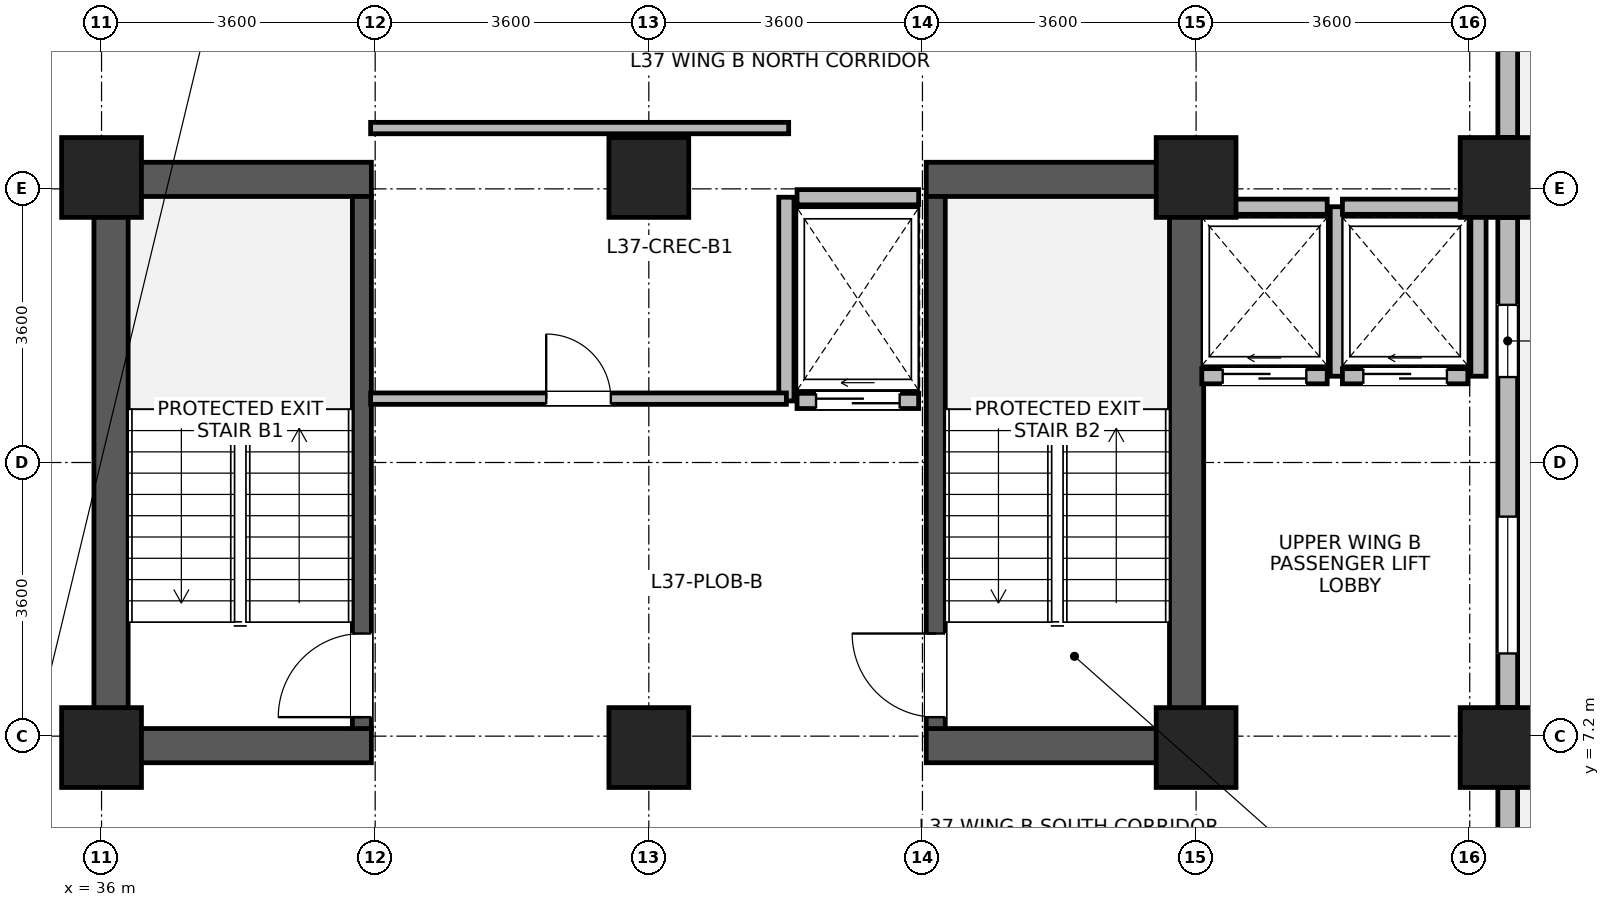
"""IFC4 building model, lengths in metres.
Left out: names, types, materials, properties, quantities, classifications, styles, units other than length and angle.
Written with IfcOpenShell. Run it as: python <this file> out.ifc"""

import sys

from ifc_helpers import new_model, si_unit, direction, frame, frame_2d, origin, origin_2d, place, context, subcontext, project, spatial, rectangle, extrude, source, transform, mapped, element, fill, save


model = new_model("IFC4")
c1 = context("Model", 3, precision=1e-05, world=origin(), true_north=direction((0.0, 1.0)))
c2 = subcontext(c1, "Body", "Model", "MODEL_VIEW")
j1 = project(units=[si_unit("LENGTHUNIT", "METRE"), si_unit("PLANEANGLEUNIT", "RADIAN")], contexts=[c1])
p1 = place(None, origin())
s1 = spatial("IfcSite", under=j1, at=p1, CompositionType="ELEMENT")
p2 = place(p1, origin())
s2 = spatial("IfcBuilding", under=s1, at=p2, CompositionType="ELEMENT")
p3 = place(p2, frame((0.0, 0.0, 147.6)))
s3 = spatial("IfcBuildingStorey", under=s2, at=p3, CompositionType="ELEMENT", Elevation=147.6)
for number, where, z_axis, x_axis in (
    (1, (36.125, 6.85, 0.0), (0.0, 0.0, 1.0), (0.0, 1.0, 0.0)),
    (2, (50.275, 6.85, 0.0), (0.0, 0.0, 1.0), (0.0, 1.0, 0.0)),
):
    element("IfcWall", number, at=place(p3, frame(where, z_axis=z_axis, x_axis=x_axis)), inside=s3, PredefinedType="SHEAR", context=c2, shape_type="SweptSolid", body=[
        extrude(rectangle(XDim=7.9, YDim=0.45, at=frame_2d((3.95, 0.0))), origin(), (0.0, 0.0, 1.0), 3.46),
    ])
for number, where, z_axis, x_axis in (
    (3, (36.35, 7.075, 0.0), (0.0, 0.0, 1.0), (1.0, 0.0, 0.0)),
    (4, (46.85, 7.075, 0.0), (0.0, 0.0, 1.0), (1.0, 0.0, 0.0)),
    (5, (36.35, 14.525, 0.0), (0.0, 0.0, 1.0), (1.0, 0.0, 0.0)),
    (6, (46.85, 14.525, 0.0), (0.0, 0.0, 1.0), (1.0, 0.0, 0.0)),
):
    element("IfcWall", number, at=place(p3, frame(where, z_axis=z_axis, x_axis=x_axis)), inside=s3, PredefinedType="SHEAR", context=c2, shape_type="SweptSolid", body=[
        extrude(rectangle(XDim=3.2, YDim=0.45, at=frame_2d((1.6, 0.0))), origin(), (0.0, 0.0, 1.0), 3.46),
    ])
p4 = place(p3, frame((39.425, 7.3, 0.0), z_axis=(0.0, 0.0, 1.0), x_axis=(0.0, 1.0, 0.0)))
e7 = element("IfcWall", 7, at=p4, inside=s3, PredefinedType="SHEAR", context=c2, shape_type="SweptSolid", body=[
    extrude(rectangle(XDim=7.0, YDim=0.25, at=frame_2d((3.5, 0.0))), origin(), (0.0, 0.0, 1.0), 3.46),
])
p5 = place(p4, frame((0.15, 0.0, 0.0)))
e8 = element("IfcOpeningElement", 8, at=p5, cuts=e7, PredefinedType="OPENING", context=c2, shape_type="SweptSolid", body=[
    extrude(rectangle(XDim=1.1, YDim=2.08, at=frame_2d((0.55, 1.04))), frame((0.0, 0.135, 0.0), z_axis=(0.0, -1.0, 0.0), x_axis=(1.0, 0.0, 0.0)), (0.0, 0.0, 1.0), 0.27),
])
p6 = place(p3, frame((46.975, 7.3, 0.0), z_axis=(0.0, 0.0, 1.0), x_axis=(0.0, 1.0, 0.0)))
e9 = element("IfcWall", 9, at=p6, inside=s3, PredefinedType="SHEAR", context=c2, shape_type="SweptSolid", body=[
    extrude(rectangle(XDim=7.0, YDim=0.25, at=frame_2d((3.5, 0.0))), origin(), (0.0, 0.0, 1.0), 3.46),
])
p7 = place(p6, frame((0.15, 0.0, 0.0)))
e10 = element("IfcOpeningElement", 10, at=p7, cuts=e9, PredefinedType="OPENING", context=c2, shape_type="SweptSolid", body=[
    extrude(rectangle(XDim=1.1, YDim=2.08, at=frame_2d((0.55, 1.04))), frame((0.0, 0.135, 0.0), z_axis=(0.0, -1.0, 0.0), x_axis=(1.0, 0.0, 0.0)), (0.0, 0.0, 1.0), 0.27),
])
m1 = source(origin(), c2, "Body", "SweptSolid", [
    extrude(rectangle(XDim=1.05, YDim=1.05, at=origin_2d()), origin(), (0.0, 0.0, 1.0), 3.7),
])
for number, where, z_axis, x_axis in (
    (11, (36.0, 7.05, 0.0), (0.0, 0.0, 1.0), (1.0, 0.0, 0.0)),
    (12, (36.0, 14.55, 0.0), (0.0, 0.0, 1.0), (1.0, 0.0, 0.0)),
    (13, (43.2, 7.05, 0.0), (0.0, 0.0, 1.0), (1.0, 0.0, 0.0)),
    (14, (43.2, 14.55, 0.0), (0.0, 0.0, 1.0), (1.0, 0.0, 0.0)),
    (15, (50.4, 7.05, 0.0), (0.0, 0.0, 1.0), (1.0, 0.0, 0.0)),
    (16, (50.4, 14.55, 0.0), (0.0, 0.0, 1.0), (1.0, 0.0, 0.0)),
    (17, (54.4, 7.05, 0.0), (0.0, 0.0, 1.0), (1.0, 0.0, 0.0)),
    (18, (54.4, 14.55, 0.0), (0.0, 0.0, 1.0), (1.0, 0.0, 0.0)),
):
    element("IfcColumn", number, at=place(p3, frame(where, z_axis=z_axis, x_axis=x_axis)), inside=s3, PredefinedType="COLUMN", context=c2, shape_type="MappedRepresentation", body=[
        mapped(m1, transform((0.0, 0.0, 0.0), x_axis=(1.0, 0.0, 0.0), y_axis=(0.0, 1.0, 0.0), z_axis=(0.0, 0.0, 1.0), scale=1.0)),
    ])
p8 = place(p3, frame((54.5, 6.524, 0.0), z_axis=(0.0, 0.0, 1.0), x_axis=(0.0, -1.0, 0.0)))
e19 = element("IfcWall", 19, at=p8, inside=s3, PredefinedType="STANDARD", context=c2, shape_type="SweptSolid", body=[
    extrude(rectangle(XDim=4.854, YDim=0.26, at=frame_2d((2.427, 0.0))), origin(), (0.0, 0.0, 1.0), 3.44),
])
p9 = place(p8, frame((2.648, 0.0, 0.0)))
e20 = element("IfcOpeningElement", 20, at=p9, cuts=e19, PredefinedType="OPENING", context=c2, shape_type="SweptSolid", body=[
    extrude(rectangle(XDim=1.5, YDim=2.15, at=frame_2d((0.75, 1.075))), frame((0.0, 0.14, 0.0), z_axis=(0.0, -1.0, 0.0), x_axis=(1.0, 0.0, 0.0)), (0.0, 0.0, 1.0), 0.28),
])
p10 = place(p3, frame((54.5, 14.024, 0.0), z_axis=(0.0, 0.0, 1.0), x_axis=(0.0, -1.0, 0.0)))
e21 = element("IfcWall", 21, at=p10, inside=s3, PredefinedType="STANDARD", context=c2, shape_type="SweptSolid", body=[
    extrude(rectangle(XDim=6.448, YDim=0.26, at=frame_2d((3.224, 0.0))), origin(), (0.0, 0.0, 1.0), 2.99),
])
p11 = place(p10, frame((3.936, 0.0, 0.85)))
e22 = element("IfcOpeningElement", 22, at=p11, cuts=e21, PredefinedType="OPENING", context=c2, shape_type="SweptSolid", body=[
    extrude(rectangle(XDim=1.8, YDim=1.85, at=frame_2d((0.9, 0.925))), frame((0.0, 0.14, 0.0), z_axis=(0.0, -1.0, 0.0), x_axis=(1.0, 0.0, 0.0)), (0.0, 0.0, 1.0), 0.28),
])
p12 = place(p10, frame((1.15, 0.0, 0.85)))
e23 = element("IfcOpeningElement", 23, at=p12, cuts=e21, PredefinedType="OPENING", context=c2, shape_type="SweptSolid", body=[
    extrude(rectangle(XDim=0.95, YDim=1.75, at=frame_2d((0.475, 0.875))), frame((0.0, 0.14, 0.0), z_axis=(0.0, -1.0, 0.0), x_axis=(1.0, 0.0, 0.0)), (0.0, 0.0, 1.0), 0.28),
])
p13 = place(p3, frame((54.5, 21.074, 0.0), z_axis=(0.0, 0.0, 1.0), x_axis=(0.0, -1.0, 0.0)))
e24 = element("IfcWall", 24, at=p13, inside=s3, PredefinedType="STANDARD", context=c2, shape_type="SweptSolid", body=[
    extrude(rectangle(XDim=5.998, YDim=0.26, at=frame_2d((2.999, 0.0))), origin(), (0.0, 0.0, 1.0), 2.99),
])
p14 = place(p13, frame((0.6, 0.0, 0.85)))
e25 = element("IfcOpeningElement", 25, at=p14, cuts=e24, PredefinedType="OPENING", context=c2, shape_type="SweptSolid", body=[
    extrude(rectangle(XDim=1.8, YDim=1.85, at=frame_2d((0.9, 0.925))), frame((0.0, 0.14, 0.0), z_axis=(0.0, -1.0, 0.0), x_axis=(1.0, 0.0, 0.0)), (0.0, 0.0, 1.0), 0.28),
])
p15 = place(p3, frame((50.475, 11.935, 0.0), z_axis=(0.0, 0.0, 1.0), x_axis=(1.0, 0.0, 0.0)))
e26 = element("IfcWall", 26, at=p15, inside=s3, PredefinedType="PARTITIONING", context=c2, shape_type="SweptSolid", body=[
    extrude(rectangle(XDim=1.65, YDim=0.2, at=frame_2d((0.825, 0.0))), origin(), (0.0, 0.0, 1.0), 3.44),
])
p16 = place(p15, frame((0.275, 0.0, 0.0)))
e27 = element("IfcOpeningElement", 27, at=p16, cuts=e26, PredefinedType="OPENING", context=c2, shape_type="SweptSolid", body=[
    extrude(rectangle(XDim=1.1, YDim=2.12, at=frame_2d((0.55, 1.06))), frame((0.0, 0.11, 0.0), z_axis=(0.0, -1.0, 0.0), x_axis=(1.0, 0.0, 0.0)), (0.0, 0.0, 1.0), 0.22),
])
p17 = place(p3, frame((50.475, 14.165, 0.0), z_axis=(0.0, 0.0, 1.0), x_axis=(1.0, 0.0, 0.0)))
e28 = element("IfcWall", 28, at=p17, inside=s3, PredefinedType="PARTITIONING", context=c2, shape_type="SweptSolid", body=[
    extrude(rectangle(XDim=1.65, YDim=0.2, at=frame_2d((0.825, 0.0))), origin(), (0.0, 0.0, 1.0), 3.44),
])
p18 = place(p3, frame((52.265, 11.935, 0.0), z_axis=(0.0, 0.0, 1.0), x_axis=(0.0, 1.0, 0.0)))
e29 = element("IfcWall", 29, at=p18, inside=s3, PredefinedType="PARTITIONING", context=c2, shape_type="SweptSolid", body=[
    extrude(rectangle(XDim=2.23, YDim=0.2, at=frame_2d((1.115, 0.0))), origin(), (0.0, 0.0, 1.0), 3.44),
])
p19 = place(p3, frame((52.325, 11.935, 0.0), z_axis=(0.0, 0.0, 1.0), x_axis=(1.0, 0.0, 0.0)))
e30 = element("IfcWall", 30, at=p19, inside=s3, PredefinedType="PARTITIONING", context=c2, shape_type="SweptSolid", body=[
    extrude(rectangle(XDim=1.65, YDim=0.2, at=frame_2d((0.825, 0.0))), origin(), (0.0, 0.0, 1.0), 3.44),
])
p20 = place(p19, frame((0.275, 0.0, 0.0)))
e31 = element("IfcOpeningElement", 31, at=p20, cuts=e30, PredefinedType="OPENING", context=c2, shape_type="SweptSolid", body=[
    extrude(rectangle(XDim=1.1, YDim=2.12, at=frame_2d((0.55, 1.06))), frame((0.0, 0.11, 0.0), z_axis=(0.0, -1.0, 0.0), x_axis=(1.0, 0.0, 0.0)), (0.0, 0.0, 1.0), 0.22),
])
p21 = place(p3, frame((52.325, 14.165, 0.0), z_axis=(0.0, 0.0, 1.0), x_axis=(1.0, 0.0, 0.0)))
e32 = element("IfcWall", 32, at=p21, inside=s3, PredefinedType="PARTITIONING", context=c2, shape_type="SweptSolid", body=[
    extrude(rectangle(XDim=1.65, YDim=0.2, at=frame_2d((0.825, 0.0))), origin(), (0.0, 0.0, 1.0), 3.44),
])
p22 = place(p3, frame((54.115, 11.935, 0.0), z_axis=(0.0, 0.0, 1.0), x_axis=(0.0, 1.0, 0.0)))
e33 = element("IfcWall", 33, at=p22, inside=s3, PredefinedType="PARTITIONING", context=c2, shape_type="SweptSolid", body=[
    extrude(rectangle(XDim=2.23, YDim=0.2, at=frame_2d((1.115, 0.0))), origin(), (0.0, 0.0, 1.0), 2.99),
])
p23 = place(p3, frame((45.15, 11.61, 0.0), z_axis=(0.0, 0.0, 1.0), x_axis=(1.0, 0.0, 0.0)))
e34 = element("IfcWall", 34, at=p23, inside=s3, PredefinedType="PARTITIONING", context=c2, shape_type="SweptSolid", body=[
    extrude(rectangle(XDim=1.6, YDim=0.2, at=frame_2d((0.8, 0.0))), origin(), (0.0, 0.0, 1.0), 3.44),
])
p24 = place(p23, frame((0.25, 0.0, 0.0)))
e35 = element("IfcOpeningElement", 35, at=p24, cuts=e34, PredefinedType="OPENING", context=c2, shape_type="SweptSolid", body=[
    extrude(rectangle(XDim=1.1, YDim=2.12, at=frame_2d((0.55, 1.06))), frame((0.0, 0.11, 0.0), z_axis=(0.0, -1.0, 0.0), x_axis=(1.0, 0.0, 0.0)), (0.0, 0.0, 1.0), 0.22),
])
p25 = place(p3, frame((45.15, 14.29, 0.0), z_axis=(0.0, 0.0, 1.0), x_axis=(1.0, 0.0, 0.0)))
e36 = element("IfcWall", 36, at=p25, inside=s3, PredefinedType="PARTITIONING", context=c2, shape_type="SweptSolid", body=[
    extrude(rectangle(XDim=1.6, YDim=0.2, at=frame_2d((0.8, 0.0))), origin(), (0.0, 0.0, 1.0), 2.44),
])
p26 = place(p3, frame((45.01, 11.61, 0.0), z_axis=(0.0, 0.0, 1.0), x_axis=(0.0, 1.0, 0.0)))
e37 = element("IfcWall", 37, at=p26, inside=s3, PredefinedType="PARTITIONING", context=c2, shape_type="SweptSolid", body=[
    extrude(rectangle(XDim=2.68, YDim=0.2, at=frame_2d((1.34, 0.0))), origin(), (0.0, 0.0, 1.0), 3.44),
])
p27 = place(p3, frame((39.54, 11.64, 0.0), z_axis=(0.0, 0.0, 1.0), x_axis=(1.0, 0.0, 0.0)))
e38 = element("IfcWall", 38, at=p27, inside=s3, PredefinedType="PARTITIONING", context=c2, shape_type="SweptSolid", body=[
    extrude(rectangle(XDim=5.47, YDim=0.15, at=frame_2d((2.735, 0.0))), origin(), (0.0, 0.0, 1.0), 3.44),
])
p28 = place(p27, frame((2.31, 0.0, 0.0)))
e39 = element("IfcOpeningElement", 39, at=p28, cuts=e38, PredefinedType="OPENING", context=c2, shape_type="SweptSolid", body=[
    extrude(rectangle(XDim=0.85, YDim=2.04, at=frame_2d((0.425, 1.02))), frame((0.0, 0.085, 0.0), z_axis=(0.0, -1.0, 0.0), x_axis=(1.0, 0.0, 0.0)), (0.0, 0.0, 1.0), 0.17),
])
p29 = place(p3, frame((39.54, 15.2, 0.0), z_axis=(0.0, 0.0, 1.0), x_axis=(1.0, 0.0, 0.0)))
e40 = element("IfcWall", 40, at=p29, inside=s3, PredefinedType="PARTITIONING", context=c2, shape_type="SweptSolid", body=[
    extrude(rectangle(XDim=5.5, YDim=0.15, at=frame_2d((2.75, 0.0))), origin(), (0.0, 0.0, 1.0), 3.44),
])
p30 = place(p11, origin())
e41 = element("IfcWindow", 41, at=p30, inside=s3, PartitioningType="SINGLE_PANEL", PredefinedType="WINDOW", context=c2, shape_type="SweptSolid", body=[
    extrude(rectangle(XDim=1.8, YDim=1.85, at=frame_2d((0.9, 0.925))), frame((0.0, 0.03, 0.0), z_axis=(0.0, -1.0, 0.0), x_axis=(1.0, 0.0, 0.0)), (0.0, 0.0, 1.0), 0.06),
])
fill(e22, e41)
p31 = place(p12, origin())
e42 = element("IfcWindow", 42, at=p31, inside=s3, PartitioningType="SINGLE_PANEL", PredefinedType="WINDOW", context=c2, shape_type="SweptSolid", body=[
    extrude(rectangle(XDim=0.95, YDim=1.75, at=frame_2d((0.475, 0.875))), frame((0.0, 0.03, 0.0), z_axis=(0.0, -1.0, 0.0), x_axis=(1.0, 0.0, 0.0)), (0.0, 0.0, 1.0), 0.06),
])
fill(e23, e42)
p32 = place(p5, origin())
e43 = element("IfcDoor", 43, at=p32, inside=s3, OperationType="SINGLE_SWING_LEFT", PredefinedType="DOOR", context=c2, shape_type="SweptSolid", body=[
    extrude(rectangle(XDim=1.1, YDim=2.08, at=frame_2d((0.55, 1.04))), frame((0.0, 0.025, 0.0), z_axis=(0.0, -1.0, 0.0), x_axis=(1.0, 0.0, 0.0)), (0.0, 0.0, 1.0), 0.05),
])
fill(e8, e43)
p33 = place(p7, origin())
e44 = element("IfcDoor", 44, at=p33, inside=s3, OperationType="SINGLE_SWING_RIGHT", PredefinedType="DOOR", context=c2, shape_type="SweptSolid", body=[
    extrude(rectangle(XDim=1.1, YDim=2.08, at=frame_2d((0.55, 1.04))), frame((0.0, 0.025, 0.0), z_axis=(0.0, -1.0, 0.0), x_axis=(1.0, 0.0, 0.0)), (0.0, 0.0, 1.0), 0.05),
])
fill(e10, e44)
p34 = place(p16, origin())
e45 = element("IfcDoor", 45, at=p34, inside=s3, OperationType="SLIDING_TO_LEFT", PredefinedType="DOOR", context=c2, shape_type="SweptSolid", body=[
    extrude(rectangle(XDim=1.1, YDim=2.12, at=frame_2d((0.55, 1.06))), frame((0.0, 0.025, 0.0), z_axis=(0.0, -1.0, 0.0), x_axis=(1.0, 0.0, 0.0)), (0.0, 0.0, 1.0), 0.05),
])
fill(e27, e45)
p35 = place(p20, origin())
e46 = element("IfcDoor", 46, at=p35, inside=s3, OperationType="SLIDING_TO_LEFT", PredefinedType="DOOR", context=c2, shape_type="SweptSolid", body=[
    extrude(rectangle(XDim=1.1, YDim=2.12, at=frame_2d((0.55, 1.06))), frame((0.0, 0.025, 0.0), z_axis=(0.0, -1.0, 0.0), x_axis=(1.0, 0.0, 0.0)), (0.0, 0.0, 1.0), 0.05),
])
fill(e31, e46)
p36 = place(p24, origin())
e47 = element("IfcDoor", 47, at=p36, inside=s3, OperationType="SLIDING_TO_LEFT", PredefinedType="DOOR", context=c2, shape_type="SweptSolid", body=[
    extrude(rectangle(XDim=1.1, YDim=2.12, at=frame_2d((0.55, 1.06))), frame((0.0, 0.025, 0.0), z_axis=(0.0, -1.0, 0.0), x_axis=(1.0, 0.0, 0.0)), (0.0, 0.0, 1.0), 0.05),
])
fill(e35, e47)
p37 = place(p28, origin())
e48 = element("IfcDoor", 48, at=p37, inside=s3, OperationType="SINGLE_SWING_LEFT", PredefinedType="DOOR", context=c2, shape_type="SweptSolid", body=[
    extrude(rectangle(XDim=0.85, YDim=2.04, at=frame_2d((0.425, 1.02))), frame((0.0, 0.025, 0.0), z_axis=(0.0, -1.0, 0.0), x_axis=(1.0, 0.0, 0.0)), (0.0, 0.0, 1.0), 0.05),
])
fill(e39, e48)
save(model, sys.argv[1])
